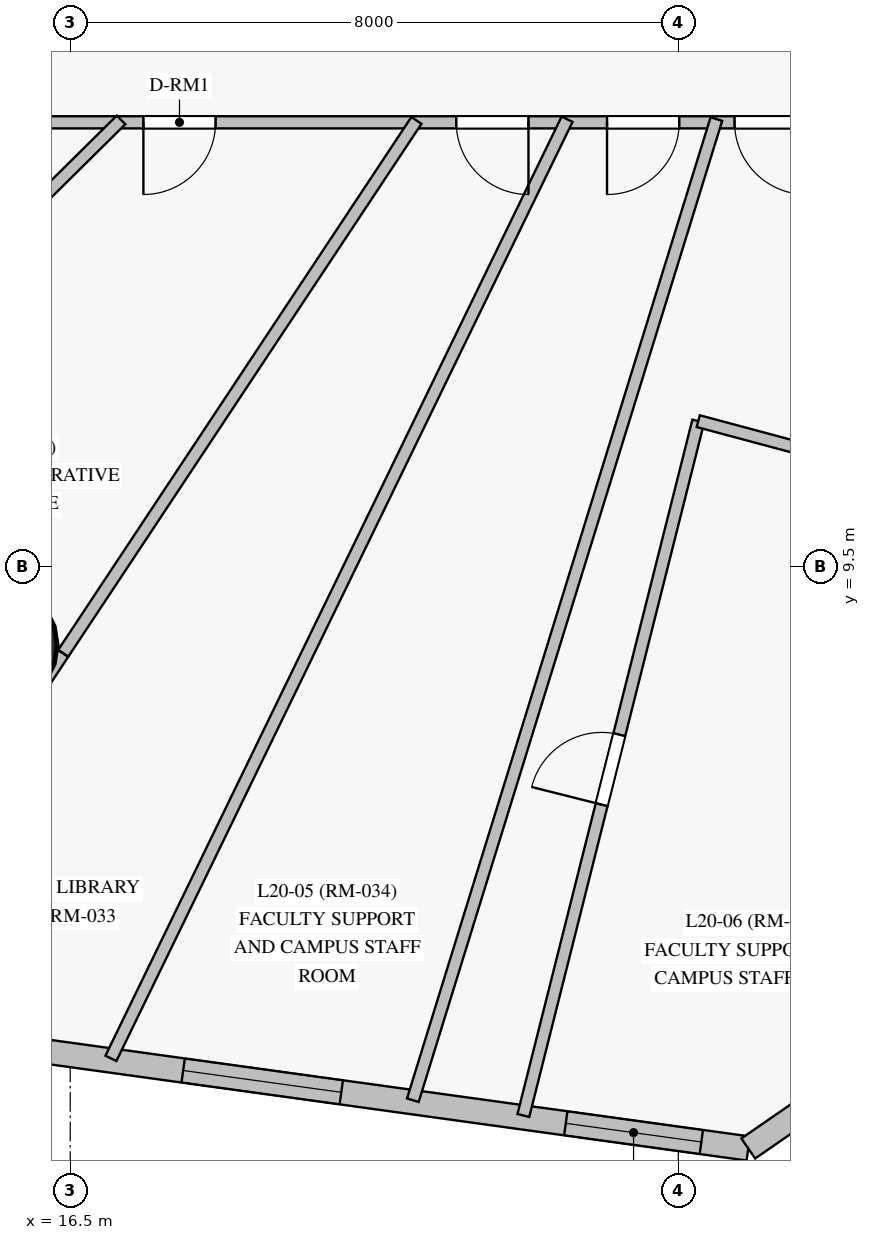
"""IFC4 building model, lengths in metres.
Left out: names, types, materials, properties, quantities, classifications, styles, units other than length and angle.
Written with IfcOpenShell. Run it as: python <this file> out.ifc"""

import sys

from ifc_helpers import new_model, si_unit, direction, frame, frame_2d, origin, origin_with_axes, origin_2d, place, context, subcontext, project, spatial, rectangle, circle, extrude, source, transform, mapped, element, fill, save


model = new_model("IFC4")
c1 = context("Model", 3, precision=1e-05, world=origin(), true_north=direction((0.0, 1.0)))
c2 = subcontext(c1, "Body", "Model", "MODEL_VIEW")
j1 = project(units=[si_unit("LENGTHUNIT", "METRE"), si_unit("PLANEANGLEUNIT", "RADIAN")], contexts=[c1])
p1 = place(None, origin())
s1 = spatial("IfcSite", under=j1, at=p1, CompositionType="ELEMENT")
p2 = place(p1, origin())
s2 = spatial("IfcBuilding", under=s1, at=p2, CompositionType="ELEMENT")
p3 = place(p2, frame((0.0, 0.0, 76.9)))
s3 = spatial("IfcBuildingStorey", under=s2, at=p3, CompositionType="ELEMENT", Elevation=76.9)
m1 = source(origin_with_axes(), c2, "Body", "SweptSolid", [
    extrude(circle(Radius=0.8, at=origin_2d()), origin(), (0.0, 0.0, 1.0), 3.6),
])
p4 = place(p3, frame((15.529, 8.472, 0.0), z_axis=(0.0, 0.0, 1.0), x_axis=(1.0, 0.0, 0.0)))
e1 = element("IfcColumn", 1, at=p4, inside=s3, PredefinedType="COLUMN", context=c2, shape_type="MappedRepresentation", body=[
    mapped(m1, transform((0.0, 0.0, 0.0), scale=1.0)),
])
p5 = place(p3, frame((15.447, 3.226, 0.0), z_axis=(0.0, 0.0, 1.0), x_axis=(0.990613318008, -0.136694016636, 0.0)))
e2 = element("IfcWall", 2, at=p5, inside=s3, PredefinedType="SOLIDWALL", context=c2, shape_type="SweptSolid", body=[
    extrude(rectangle(XDim=10.068, YDim=0.32, at=frame_2d((5.034, 0.0))), origin(), (0.0, 0.0, 1.0), 3.35),
])
p6 = place(p5, frame((2.563, 0.0, 0.85)))
e3 = element("IfcOpeningElement", 3, at=p6, cuts=e2, PredefinedType="OPENING", context=c2, shape_type="SweptSolid", body=[
    extrude(rectangle(XDim=2.1, YDim=1.95, at=frame_2d((1.05, 0.975))), frame((0.0, 0.17, 0.0), z_axis=(0.0, -1.0, 0.0), x_axis=(1.0, 0.0, 0.0)), (0.0, 0.0, 1.0), 0.34),
])
p7 = place(p5, frame((7.645, 0.0, 0.85)))
e4 = element("IfcOpeningElement", 4, at=p7, cuts=e2, PredefinedType="OPENING", context=c2, shape_type="SweptSolid", body=[
    extrude(rectangle(XDim=1.8, YDim=1.85, at=frame_2d((0.9, 0.925))), frame((0.0, 0.17, 0.0), z_axis=(0.0, -1.0, 0.0), x_axis=(1.0, 0.0, 0.0)), (0.0, 0.0, 1.0), 0.34),
])
p8 = place(p3, frame((25.42, 1.85, 0.0), z_axis=(0.0, 0.0, 1.0), x_axis=(0.822842271762, 0.568269826581, 0.0)))
e5 = element("IfcWall", 5, at=p8, inside=s3, PredefinedType="SOLIDWALL", context=c2, shape_type="SweptSolid", body=[
    extrude(rectangle(XDim=15.076, YDim=0.32, at=frame_2d((7.538, 0.0))), origin(), (0.0, 0.0, 1.0), 3.35),
])
p9 = place(p8, frame((4.677, 0.0, 0.85)))
e6 = element("IfcOpeningElement", 6, at=p9, cuts=e5, PredefinedType="OPENING", context=c2, shape_type="SweptSolid", body=[
    extrude(rectangle(XDim=2.1, YDim=1.95, at=frame_2d((1.05, 0.975))), frame((0.0, 0.17, 0.0), z_axis=(0.0, -1.0, 0.0), x_axis=(1.0, 0.0, 0.0)), (0.0, 0.0, 1.0), 0.34),
])
p10 = place(p8, frame((10.992, 0.0, 0.85)))
e7 = element("IfcOpeningElement", 7, at=p10, cuts=e5, PredefinedType="OPENING", context=c2, shape_type="SweptSolid", body=[
    extrude(rectangle(XDim=2.1, YDim=1.95, at=frame_2d((1.05, 0.975))), frame((0.0, 0.17, 0.0), z_axis=(0.0, -1.0, 0.0), x_axis=(1.0, 0.0, 0.0)), (0.0, 0.0, 1.0), 0.34),
])
p11 = place(p3, frame((40.25, 15.35, 0.0), z_axis=(0.0, 0.0, 1.0), x_axis=(-1.0, 0.0, 0.0)))
e8 = element("IfcWall", 8, at=p11, inside=s3, PredefinedType="PARTITIONING", context=c2, shape_type="SweptSolid", body=[
    extrude(rectangle(XDim=29.75, YDim=0.16, at=frame_2d((14.875, 0.0))), origin(), (0.0, 0.0, 1.0), 2.7),
])
p12 = place(p11, frame((26.037, 0.0, 0.0)))
e9 = element("IfcOpeningElement", 9, at=p12, cuts=e8, PredefinedType="OPENING", context=c2, shape_type="SweptSolid", body=[
    extrude(rectangle(XDim=0.96, YDim=2.15, at=frame_2d((0.48, 1.075))), frame((0.0, 0.09, 0.0), z_axis=(0.0, -1.0, 0.0), x_axis=(1.0, 0.0, 0.0)), (0.0, 0.0, 1.0), 0.18),
])
p13 = place(p11, frame((21.837, 0.0, 0.0)))
e10 = element("IfcOpeningElement", 10, at=p13, cuts=e8, PredefinedType="OPENING", context=c2, shape_type="SweptSolid", body=[
    extrude(rectangle(XDim=0.95, YDim=2.15, at=frame_2d((0.475, 1.075))), frame((0.0, 0.09, 0.0), z_axis=(0.0, -1.0, 0.0), x_axis=(1.0, 0.0, 0.0)), (0.0, 0.0, 1.0), 0.18),
])
p14 = place(p11, frame((17.721, 0.0, 0.0)))
e11 = element("IfcOpeningElement", 11, at=p14, cuts=e8, PredefinedType="OPENING", context=c2, shape_type="SweptSolid", body=[
    extrude(rectangle(XDim=0.95, YDim=2.15, at=frame_2d((0.475, 1.075))), frame((0.0, 0.09, 0.0), z_axis=(0.0, -1.0, 0.0), x_axis=(1.0, 0.0, 0.0)), (0.0, 0.0, 1.0), 0.18),
])
p15 = place(p11, frame((15.738, 0.0, 0.0)))
e12 = element("IfcOpeningElement", 12, at=p15, cuts=e8, PredefinedType="OPENING", context=c2, shape_type="SweptSolid", body=[
    extrude(rectangle(XDim=0.95, YDim=2.15, at=frame_2d((0.475, 1.075))), frame((0.0, 0.09, 0.0), z_axis=(0.0, -1.0, 0.0), x_axis=(1.0, 0.0, 0.0)), (0.0, 0.0, 1.0), 0.18),
])
p16 = place(p11, frame((14.06, 0.0, 0.0)))
e13 = element("IfcOpeningElement", 13, at=p16, cuts=e8, PredefinedType="OPENING", context=c2, shape_type="SweptSolid", body=[
    extrude(rectangle(XDim=0.95, YDim=2.15, at=frame_2d((0.475, 1.075))), frame((0.0, 0.09, 0.0), z_axis=(0.0, -1.0, 0.0), x_axis=(1.0, 0.0, 0.0)), (0.0, 0.0, 1.0), 0.18),
])
p17 = place(p11, frame((2.16, 0.0, 0.0)))
e14 = element("IfcOpeningElement", 14, at=p17, cuts=e8, PredefinedType="OPENING", context=c2, shape_type="SweptSolid", body=[
    extrude(rectangle(XDim=0.95, YDim=2.15, at=frame_2d((0.475, 1.075))), frame((0.0, 0.09, 0.0), z_axis=(0.0, -1.0, 0.0), x_axis=(1.0, 0.0, 0.0)), (0.0, 0.0, 1.0), 0.18),
])
p18 = place(p3, frame((23.037, 15.39, 0.0), z_axis=(0.0, 0.0, 1.0), x_axis=(-0.436938889673, -0.899491193226, 0.0)))
e15 = element("IfcWall", 15, at=p18, inside=s3, PredefinedType="PARTITIONING", context=c2, shape_type="SweptSolid", body=[
    extrude(rectangle(XDim=13.735, YDim=0.16, at=frame_2d((6.868, 0.0))), origin(), (0.0, 0.0, 1.0), 3.35),
])
p19 = place(p3, frame((25.001, 15.393, 0.0), z_axis=(0.0, 0.0, 1.0), x_axis=(-0.29553806887, -0.955330963514, 0.0)))
e16 = element("IfcWall", 16, at=p19, inside=s3, PredefinedType="PARTITIONING", context=c2, shape_type="SweptSolid", body=[
    extrude(rectangle(XDim=13.511, YDim=0.16, at=frame_2d((6.756, 0.0))), origin(), (0.0, 0.0, 1.0), 3.35),
])
p20 = place(p3, frame((22.461, 2.284, 0.0), z_axis=(0.0, 0.0, 1.0), x_axis=(0.244291469889, 0.969701849921, 0.0)))
e17 = element("IfcWall", 17, at=p20, inside=s3, PredefinedType="PARTITIONING", context=c2, shape_type="SweptSolid", body=[
    extrude(rectangle(XDim=9.42, YDim=0.16, at=frame_2d((4.71, 0.0))), origin(), (0.0, 0.0, 1.0), 3.35),
])
p21 = place(p20, frame((4.218, 0.0, 0.0)))
e18 = element("IfcOpeningElement", 18, at=p21, cuts=e17, PredefinedType="OPENING", context=c2, shape_type="SweptSolid", body=[
    extrude(rectangle(XDim=0.95, YDim=2.15, at=frame_2d((0.475, 1.075))), frame((0.0, 0.09, 0.0), z_axis=(0.0, -1.0, 0.0), x_axis=(1.0, 0.0, 0.0)), (0.0, 0.0, 1.0), 0.18),
])
p22 = place(p3, frame((17.169, 15.382, 0.0), z_axis=(0.0, 0.0, 1.0), x_axis=(-0.711131694036, -0.703058826654, 0.0)))
e19 = element("IfcWall", 19, at=p22, inside=s3, PredefinedType="PARTITIONING", context=c2, shape_type="SweptSolid", body=[
    extrude(rectangle(XDim=9.163, YDim=0.16, at=frame_2d((4.582, 0.0))), origin(), (0.0, 0.0, 1.0), 3.35),
])
p23 = place(p3, frame((21.055, 15.375, 0.0), z_axis=(0.0, 0.0, 1.0), x_axis=(-0.552453765645, -0.833543542248, 0.0)))
e20 = element("IfcWall", 20, at=p23, inside=s3, PredefinedType="PARTITIONING", context=c2, shape_type="SweptSolid", body=[
    extrude(rectangle(XDim=8.409, YDim=0.16, at=frame_2d((4.205, 0.0))), origin(), (0.0, 0.0, 1.0), 3.35),
])
p24 = place(p3, frame((16.406, 8.361, 0.0), z_axis=(0.0, 0.0, 1.0), x_axis=(-0.552446963092, -0.833548050787, 0.0)))
e21 = element("IfcWall", 21, at=p24, inside=s3, PredefinedType="PARTITIONING", context=c2, shape_type="SweptSolid", body=[
    extrude(rectangle(XDim=4.205, YDim=0.16, at=frame_2d((2.102, 0.0))), origin(), (0.0, 0.0, 1.0), 3.35),
])
p25 = place(p3, frame((24.763, 11.419, 0.0), z_axis=(0.0, 0.0, 1.0), x_axis=(0.965909841148, -0.258878695094, 0.0)))
e22 = element("IfcWall", 22, at=p25, inside=s3, PredefinedType="PARTITIONING", context=c2, shape_type="SweptSolid", body=[
    extrude(rectangle(XDim=3.023, YDim=0.16, at=frame_2d((1.512, 0.0))), origin(), (0.0, 0.0, 1.0), 2.75),
])
m2 = source(origin_with_axes(), c2, "Body", "SweptSolid", [
    extrude(rectangle(XDim=2.1, YDim=1.95, at=frame_2d((1.05, 0.975))), frame((0.0, 0.03, 0.0), z_axis=(0.0, -1.0, 0.0), x_axis=(1.0, 0.0, 0.0)), (0.0, 0.0, 1.0), 0.06),
])
p26 = place(p6, origin())
e23 = element("IfcWindow", 23, at=p26, inside=s3, PartitioningType="SINGLE_PANEL", PredefinedType="WINDOW", context=c2, shape_type="MappedRepresentation", body=[
    mapped(m2, transform((0.0, 0.0, 0.0), scale=1.0)),
])
fill(e3, e23)
m3 = source(origin_with_axes(), c2, "Body", "SweptSolid", [
    extrude(rectangle(XDim=1.8, YDim=1.85, at=frame_2d((0.9, 0.925))), frame((0.0, 0.03, 0.0), z_axis=(0.0, -1.0, 0.0), x_axis=(1.0, 0.0, 0.0)), (0.0, 0.0, 1.0), 0.06),
])
p27 = place(p7, origin())
e24 = element("IfcWindow", 24, at=p27, inside=s3, PartitioningType="SINGLE_PANEL", PredefinedType="WINDOW", context=c2, shape_type="MappedRepresentation", body=[
    mapped(m3, transform((0.0, 0.0, 0.0), scale=1.0)),
])
fill(e4, e24)
m4 = source(origin_with_axes(), c2, "Body", "SweptSolid", [
    extrude(rectangle(XDim=0.95, YDim=2.15, at=frame_2d((0.475, 1.075))), frame((0.0, 0.025, 0.0), z_axis=(0.0, -1.0, 0.0), x_axis=(1.0, 0.0, 0.0)), (0.0, 0.0, 1.0), 0.05),
])
p28 = place(p13, origin())
e25 = element("IfcDoor", 25, at=p28, inside=s3, OperationType="SINGLE_SWING_RIGHT", PredefinedType="DOOR", context=c2, shape_type="MappedRepresentation", body=[
    mapped(m4, transform((0.0, 0.0, 0.0), scale=1.0)),
])
fill(e10, e25)
p29 = place(p14, origin())
e26 = element("IfcDoor", 26, at=p29, inside=s3, OperationType="SINGLE_SWING_LEFT", PredefinedType="DOOR", context=c2, shape_type="MappedRepresentation", body=[
    mapped(m4, transform((0.0, 0.0, 0.0), scale=1.0)),
])
fill(e11, e26)
p30 = place(p15, origin())
e27 = element("IfcDoor", 27, at=p30, inside=s3, OperationType="SINGLE_SWING_RIGHT", PredefinedType="DOOR", context=c2, shape_type="MappedRepresentation", body=[
    mapped(m4, transform((0.0, 0.0, 0.0), scale=1.0)),
])
fill(e12, e27)
p31 = place(p16, origin())
e28 = element("IfcDoor", 28, at=p31, inside=s3, OperationType="SINGLE_SWING_LEFT", PredefinedType="DOOR", context=c2, shape_type="MappedRepresentation", body=[
    mapped(m4, transform((0.0, 0.0, 0.0), scale=1.0)),
])
fill(e13, e28)
p32 = place(p21, origin())
e29 = element("IfcDoor", 29, at=p32, inside=s3, OperationType="SINGLE_SWING_LEFT", PredefinedType="DOOR", context=c2, shape_type="MappedRepresentation", body=[
    mapped(m4, transform((0.0, 0.0, 0.0), scale=1.0)),
])
fill(e18, e29)
save(model, sys.argv[1])
